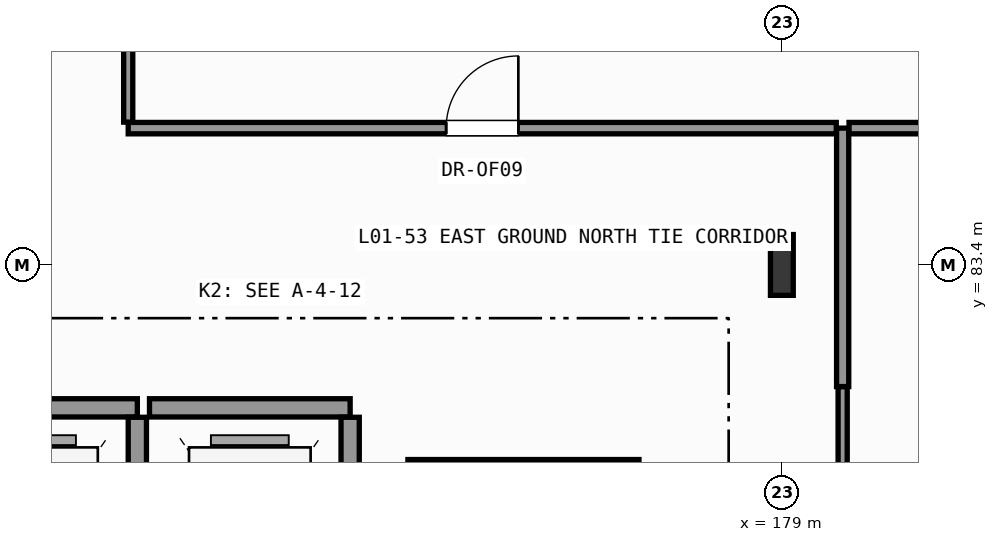
"""IFC4 building model, lengths in metres.
Left out: names, types, materials, properties, quantities, classifications, styles, units other than length and angle.
Written with IfcOpenShell. Run it as: python <this file> out.ifc"""

import sys

from ifc_helpers import new_model, si_unit, direction, frame, frame_2d, origin, origin_2d, place, context, subcontext, project, spatial, rectangle, i_section, extrude, element, fill, save


model = new_model("IFC4")
c1 = context("Model", 3, precision=1e-05, world=origin(), true_north=direction((0.0, 1.0)))
c2 = subcontext(c1, "Body", "Model", "MODEL_VIEW")
j1 = project(units=[si_unit("LENGTHUNIT", "METRE"), si_unit("PLANEANGLEUNIT", "RADIAN")], contexts=[c1])
p1 = place(None, origin())
s1 = spatial("IfcSite", under=j1, at=p1, CompositionType="ELEMENT")
p2 = place(p1, origin())
s2 = spatial("IfcBuilding", under=s1, at=p2, CompositionType="ELEMENT")
p3 = place(p2, origin())
s3 = spatial("IfcBuildingStorey", under=s2, at=p3, CompositionType="ELEMENT", Elevation=0.0)
p4 = place(p3, frame((179.0, 83.4, 0.0), z_axis=(0.0, 0.0, 1.0), x_axis=(1.0, 0.0, 0.0)))
e1 = element("IfcColumn", 1, at=p4, inside=s3, PredefinedType="COLUMN", context=c2, shape_type="SweptSolid", body=[
    extrude(i_section(OverallWidth=0.3, OverallDepth=0.8, WebThickness=0.018, FlangeThickness=0.033, FilletRadius=0.03, at=origin_2d()), origin(), (0.0, 0.0, 1.0), 7.8),
])
p5 = place(p3, frame((167.88, 81.52, 0.0), z_axis=(0.0, 0.0, 1.0), x_axis=(1.0, 0.0, 0.0)))
e2 = element("IfcWall", 2, at=p5, inside=s3, PredefinedType="SHEAR", context=c2, shape_type="SweptSolid", body=[
    extrude(rectangle(XDim=2.64, YDim=0.24, at=frame_2d((1.32, 0.0))), origin(), (0.0, 0.0, 1.0), 7.54),
])
p6 = place(p3, frame((170.52, 78.204, 0.0), z_axis=(0.0, 0.0, 1.0), x_axis=(0.0, 1.0, 0.0)))
e3 = element("IfcWall", 3, at=p6, inside=s3, PredefinedType="SHEAR", context=c2, shape_type="SweptSolid", body=[
    extrude(rectangle(XDim=3.192, YDim=0.24, at=frame_2d((1.596, 0.0))), origin(), (0.0, 0.0, 1.0), 7.54),
])
p7 = place(p3, frame((170.68, 81.52, 0.0), z_axis=(0.0, 0.0, 1.0), x_axis=(1.0, 0.0, 0.0)))
e4 = element("IfcWall", 4, at=p7, inside=s3, PredefinedType="SHEAR", context=c2, shape_type="SweptSolid", body=[
    extrude(rectangle(XDim=2.64, YDim=0.24, at=frame_2d((1.32, 0.0))), origin(), (0.0, 0.0, 1.0), 7.54),
])
p8 = place(p3, frame((173.32, 78.204, 0.0), z_axis=(0.0, 0.0, 1.0), x_axis=(0.0, 1.0, 0.0)))
e5 = element("IfcWall", 5, at=p8, inside=s3, PredefinedType="SHEAR", context=c2, shape_type="SweptSolid", body=[
    extrude(rectangle(XDim=3.192, YDim=0.24, at=frame_2d((1.596, 0.0))), origin(), (0.0, 0.0, 1.0), 7.54),
])
p9 = place(p3, frame((174.08, 80.72, 0.0), z_axis=(0.0, 0.0, 1.0), x_axis=(1.0, 0.0, 0.0)))
e6 = element("IfcWall", 6, at=p9, inside=s3, PredefinedType="SHEAR", context=c2, shape_type="SweptSolid", body=[
    extrude(rectangle(XDim=3.04, YDim=0.24, at=frame_2d((1.52, 0.0))), origin(), (0.0, 0.0, 1.0), 7.54),
])
p10 = place(p3, frame((179.8, 73.5, 0.0), z_axis=(0.0, 0.0, 1.0), x_axis=(0.0, 1.0, 0.0)))
e7 = element("IfcWall", 7, at=p10, inside=s3, PredefinedType="PARTITIONING", context=c2, shape_type="SweptSolid", body=[
    extrude(rectangle(XDim=8.3, YDim=0.12, at=frame_2d((4.15, 0.0))), origin(), (0.0, 0.0, 1.0), 7.54),
])
p11 = place(p10, frame((4.31, 0.0, 0.0)))
e8 = element("IfcOpeningElement", 8, at=p11, cuts=e7, PredefinedType="OPENING", context=c2, shape_type="SweptSolid", body=[
    extrude(rectangle(XDim=2.2, YDim=2.6, at=frame_2d((1.1, 1.3))), frame((0.0, 0.07, 0.0), z_axis=(0.0, -1.0, 0.0), x_axis=(1.0, 0.0, 0.0)), (0.0, 0.0, 1.0), 0.14),
])
p12 = place(p3, frame((179.8, 81.8, 0.0), z_axis=(0.0, 0.0, 1.0), x_axis=(0.0, 1.0, 0.0)))
e9 = element("IfcWall", 9, at=p12, inside=s3, PredefinedType="PARTITIONING", context=c2, shape_type="SweptSolid", body=[
    extrude(rectangle(XDim=3.4, YDim=0.16, at=frame_2d((1.7, 0.0))), origin(), (0.0, 0.0, 1.0), 7.54),
])
p13 = place(p3, frame((170.4, 85.2, 0.0), z_axis=(0.0, 0.0, 1.0), x_axis=(1.0, 0.0, 0.0)))
e10 = element("IfcWall", 10, at=p13, inside=s3, PredefinedType="PARTITIONING", context=c2, shape_type="SweptSolid", body=[
    extrude(rectangle(XDim=9.316, YDim=0.15, at=frame_2d((4.658, 0.0))), origin(), (0.0, 0.0, 1.0), 7.54),
])
p14 = place(p13, frame((4.183, 0.0, 0.0)))
e11 = element("IfcOpeningElement", 11, at=p14, cuts=e10, PredefinedType="OPENING", context=c2, shape_type="SweptSolid", body=[
    extrude(rectangle(XDim=0.95, YDim=2.1, at=frame_2d((0.475, 1.05))), frame((0.0, 0.085, 0.0), z_axis=(0.0, -1.0, 0.0), x_axis=(1.0, 0.0, 0.0)), (0.0, 0.0, 1.0), 0.17),
])
p15 = place(p3, frame((170.4, 85.279, 0.0), z_axis=(0.0, 0.0, 1.0), x_axis=(0.0, 1.0, 0.0)))
e12 = element("IfcWall", 12, at=p15, inside=s3, PredefinedType="PARTITIONING", context=c2, shape_type="SweptSolid", body=[
    extrude(rectangle(XDim=27.842, YDim=0.12, at=frame_2d((13.921, 0.0))), origin(), (0.0, 0.0, 1.0), 7.54),
])
p16 = place(p15, frame((13.396, 0.0, 0.0)))
e13 = element("IfcOpeningElement", 13, at=p16, cuts=e12, PredefinedType="OPENING", context=c2, shape_type="SweptSolid", body=[
    extrude(rectangle(XDim=1.05, YDim=2.2, at=frame_2d((0.525, 1.1))), frame((0.0, 0.07, 0.0), z_axis=(0.0, -1.0, 0.0), x_axis=(1.0, 0.0, 0.0)), (0.0, 0.0, 1.0), 0.14),
])
p17 = place(p3, frame((179.884, 85.2, 0.0), z_axis=(0.0, 0.0, 1.0), x_axis=(1.0, 0.0, 0.0)))
e14 = element("IfcWall", 14, at=p17, inside=s3, PredefinedType="PARTITIONING", context=c2, shape_type="SweptSolid", body=[
    extrude(rectangle(XDim=11.737, YDim=0.15, at=frame_2d((5.869, 0.0))), origin(), (0.0, 0.0, 1.0), 7.54),
])
p18 = place(p14, origin())
e15 = element("IfcDoor", 15, at=p18, inside=s3, OperationType="SINGLE_SWING_RIGHT", PredefinedType="DOOR", context=c2, shape_type="SweptSolid", body=[
    extrude(rectangle(XDim=0.95, YDim=2.1, at=frame_2d((0.475, 1.05))), frame((0.0, 0.025, 0.0), z_axis=(0.0, -1.0, 0.0), x_axis=(1.0, 0.0, 0.0)), (0.0, 0.0, 1.0), 0.05),
])
fill(e11, e15)
save(model, sys.argv[1])
